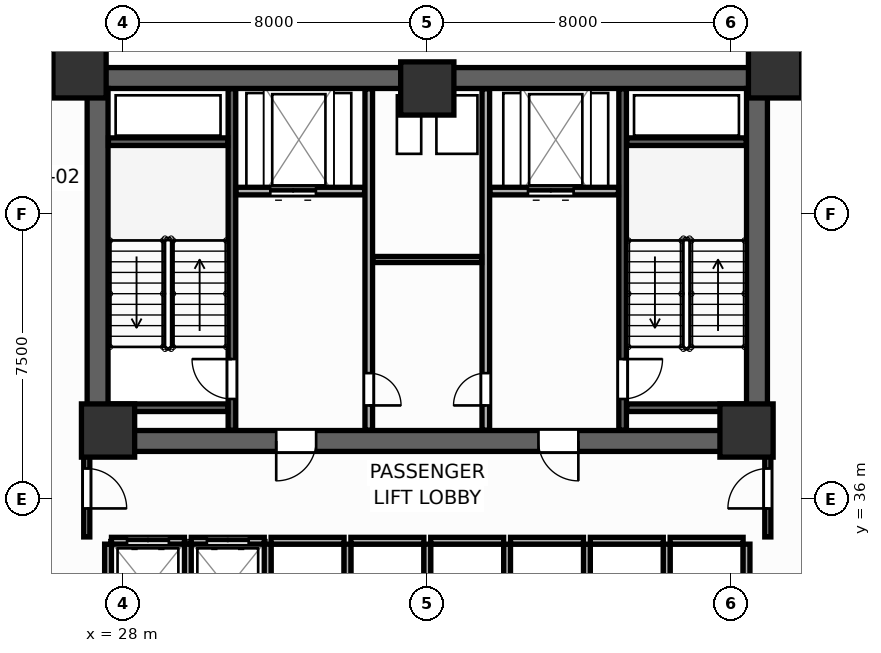
"""IFC4 building model, lengths in metres.
Left out: names, types, materials, properties, quantities, classifications, styles, units other than length and angle.
Written with IfcOpenShell. Run it as: python <this file> out.ifc"""

import sys

from ifc_helpers import new_model, si_unit, direction, frame, frame_2d, origin, origin_2d, place, context, subcontext, project, spatial, rectangle, extrude, source, transform, mapped, element, fill, save


model = new_model("IFC4")
c1 = context("Model", 3, precision=1e-05, world=origin(), true_north=direction((0.0, 1.0)))
c2 = subcontext(c1, "Body", "Model", "MODEL_VIEW")
j1 = project(units=[si_unit("LENGTHUNIT", "METRE"), si_unit("PLANEANGLEUNIT", "RADIAN")], contexts=[c1])
p1 = place(None, origin())
s1 = spatial("IfcSite", under=j1, at=p1, CompositionType="ELEMENT")
p2 = place(p1, origin())
s2 = spatial("IfcBuilding", under=s1, at=p2, CompositionType="ELEMENT")
p3 = place(p2, frame((0.0, 0.0, 35.7)))
s3 = spatial("IfcBuildingStorey", under=s2, at=p3, CompositionType="ELEMENT", Elevation=35.7)
p4 = place(p3, frame((27.05, 47.075, 0.0), z_axis=(0.0, 0.0, 1.0), x_axis=(1.0, 0.0, 0.0)))
e1 = element("IfcWall", 1, at=p4, inside=s3, PredefinedType="SHEAR", context=c2, shape_type="SweptSolid", body=[
    extrude(rectangle(XDim=17.9, YDim=0.55, at=frame_2d((8.95, 0.0))), origin(), (0.0, 0.0, 1.0), 3.9),
])
p5 = place(p3, frame((27.05, 37.525, 0.0), z_axis=(0.0, 0.0, 1.0), x_axis=(1.0, 0.0, 0.0)))
e2 = element("IfcWall", 2, at=p5, inside=s3, PredefinedType="SHEAR", context=c2, shape_type="SweptSolid", body=[
    extrude(rectangle(XDim=17.9, YDim=0.55, at=frame_2d((8.95, 0.0))), origin(), (0.0, 0.0, 1.0), 3.9),
])
p6 = place(p5, frame((4.975, 0.0, 0.0)))
e3 = element("IfcOpeningElement", 3, at=p6, cuts=e2, PredefinedType="OPENING", context=c2, shape_type="SweptSolid", body=[
    extrude(rectangle(XDim=1.05, YDim=2.1, at=frame_2d((0.525, 1.05))), frame((0.0, 0.285, 0.0), z_axis=(0.0, -1.0, 0.0), x_axis=(1.0, 0.0, 0.0)), (0.0, 0.0, 1.0), 0.57),
])
p7 = place(p5, frame((11.875, 0.0, 0.0)))
e4 = element("IfcOpeningElement", 4, at=p7, cuts=e2, PredefinedType="OPENING", context=c2, shape_type="SweptSolid", body=[
    extrude(rectangle(XDim=1.05, YDim=2.1, at=frame_2d((0.525, 1.05))), frame((0.0, 0.285, 0.0), z_axis=(0.0, -1.0, 0.0), x_axis=(1.0, 0.0, 0.0)), (0.0, 0.0, 1.0), 0.57),
])
for number, where, z_axis, x_axis in (
    (5, (27.325, 37.8, 0.0), (0.0, 0.0, 1.0), (0.0, 1.0, 0.0)),
    (6, (44.675, 37.8, 0.0), (0.0, 0.0, 1.0), (0.0, 1.0, 0.0)),
):
    element("IfcWall", number, at=place(p3, frame(where, z_axis=z_axis, x_axis=x_axis)), inside=s3, PredefinedType="SHEAR", context=c2, shape_type="SweptSolid", body=[
        extrude(rectangle(XDim=9.0, YDim=0.55, at=frame_2d((4.5, 0.0))), origin(), (0.0, 0.0, 1.0), 3.9),
    ])
m1 = source(origin(), c2, "Body", "SweptSolid", [
    extrude(rectangle(XDim=1.4, YDim=1.4, at=origin_2d()), origin(), (0.0, 0.0, 1.0), 3.9),
])
for number, where, z_axis, x_axis in (
    (7, (26.85, 47.25, 0.0), (0.0, 0.0, 1.0), (1.0, 0.0, 0.0)),
    (8, (45.15, 47.25, 0.0), (0.0, 0.0, 1.0), (1.0, 0.0, 0.0)),
    (9, (27.6, 37.8, 0.0), (0.0, 0.0, 1.0), (1.0, 0.0, 0.0)),
    (10, (44.4, 37.8, 0.0), (0.0, 0.0, 1.0), (1.0, 0.0, 0.0)),
    (11, (36.0, 46.8, 0.0), (0.0, 0.0, 1.0), (1.0, 0.0, 0.0)),
):
    element("IfcColumn", number, at=place(p3, frame(where, z_axis=z_axis, x_axis=x_axis)), inside=s3, PredefinedType="COLUMN", context=c2, shape_type="MappedRepresentation", body=[
        mapped(m1, transform((0.0, 0.0, 0.0), scale=1.0)),
    ])
p8 = place(p3, frame((30.86, 37.81, 0.0), z_axis=(0.0, 0.0, 1.0), x_axis=(0.0, 1.0, 0.0)))
e12 = element("IfcWall", 12, at=p8, inside=s3, PredefinedType="SHEAR", context=c2, shape_type="SweptSolid", body=[
    extrude(rectangle(XDim=8.98, YDim=0.2, at=frame_2d((4.49, 0.0))), origin(), (0.0, 0.0, 1.0), 3.9),
])
p9 = place(p8, frame((0.82, 0.0, 0.0)))
e13 = element("IfcOpeningElement", 13, at=p9, cuts=e12, PredefinedType="OPENING", context=c2, shape_type="SweptSolid", body=[
    extrude(rectangle(XDim=1.05, YDim=2.1, at=frame_2d((0.525, 1.05))), frame((0.0, 0.11, 0.0), z_axis=(0.0, -1.0, 0.0), x_axis=(1.0, 0.0, 0.0)), (0.0, 0.0, 1.0), 0.22),
])
for number, where, z_axis, x_axis in (
    (14, (27.61, 45.4, 0.0), (0.0, 0.0, 1.0), (1.0, 0.0, 0.0)),
    (15, (27.61, 38.4, 0.0), (0.0, 0.0, 1.0), (1.0, 0.0, 0.0)),
):
    element("IfcWall", number, at=place(p3, frame(where, z_axis=z_axis, x_axis=x_axis)), inside=s3, PredefinedType="SHEAR", context=c2, shape_type="SweptSolid", body=[
        extrude(rectangle(XDim=3.14, YDim=0.2, at=frame_2d((1.57, 0.0))), origin(), (0.0, 0.0, 1.0), 3.9),
    ])
p10 = place(p3, frame((41.14, 37.81, 0.0), z_axis=(0.0, 0.0, 1.0), x_axis=(0.0, 1.0, 0.0)))
e16 = element("IfcWall", 16, at=p10, inside=s3, PredefinedType="SHEAR", context=c2, shape_type="SweptSolid", body=[
    extrude(rectangle(XDim=8.98, YDim=0.2, at=frame_2d((4.49, 0.0))), origin(), (0.0, 0.0, 1.0), 3.9),
])
p11 = place(p10, frame((0.82, 0.0, 0.0)))
e17 = element("IfcOpeningElement", 17, at=p11, cuts=e16, PredefinedType="OPENING", context=c2, shape_type="SweptSolid", body=[
    extrude(rectangle(XDim=1.05, YDim=2.1, at=frame_2d((0.525, 1.05))), frame((0.0, 0.11, 0.0), z_axis=(0.0, -1.0, 0.0), x_axis=(1.0, 0.0, 0.0)), (0.0, 0.0, 1.0), 0.22),
])
for number, where, z_axis, x_axis in (
    (18, (41.25, 45.4, 0.0), (0.0, 0.0, 1.0), (1.0, 0.0, 0.0)),
    (19, (41.25, 38.4, 0.0), (0.0, 0.0, 1.0), (1.0, 0.0, 0.0)),
):
    element("IfcWall", number, at=place(p3, frame(where, z_axis=z_axis, x_axis=x_axis)), inside=s3, PredefinedType="SHEAR", context=c2, shape_type="SweptSolid", body=[
        extrude(rectangle(XDim=3.14, YDim=0.2, at=frame_2d((1.57, 0.0))), origin(), (0.0, 0.0, 1.0), 3.9),
    ])
p12 = place(p3, frame((30.97, 44.1, 0.0), z_axis=(0.0, 0.0, 1.0), x_axis=(1.0, 0.0, 0.0)))
e20 = element("IfcWall", 20, at=p12, inside=s3, PredefinedType="PARTITIONING", context=c2, shape_type="SweptSolid", body=[
    extrude(rectangle(XDim=3.38, YDim=0.2, at=frame_2d((1.69, 0.0))), origin(), (0.0, 0.0, 1.0), 3.68),
])
p13 = place(p12, frame((0.9, 0.0, 0.0)))
e21 = element("IfcOpeningElement", 21, at=p13, cuts=e20, PredefinedType="OPENING", context=c2, shape_type="SweptSolid", body=[
    extrude(rectangle(XDim=1.2, YDim=2.1, at=frame_2d((0.6, 1.05))), frame((0.0, 0.11, 0.0), z_axis=(0.0, -1.0, 0.0), x_axis=(1.0, 0.0, 0.0)), (0.0, 0.0, 1.0), 0.22),
])
p14 = place(p3, frame((37.65, 44.1, 0.0), z_axis=(0.0, 0.0, 1.0), x_axis=(1.0, 0.0, 0.0)))
e22 = element("IfcWall", 22, at=p14, inside=s3, PredefinedType="PARTITIONING", context=c2, shape_type="SweptSolid", body=[
    extrude(rectangle(XDim=3.38, YDim=0.2, at=frame_2d((1.69, 0.0))), origin(), (0.0, 0.0, 1.0), 3.68),
])
p15 = place(p14, frame((1.0, 0.0, 0.0)))
e23 = element("IfcOpeningElement", 23, at=p15, cuts=e22, PredefinedType="OPENING", context=c2, shape_type="SweptSolid", body=[
    extrude(rectangle(XDim=1.2, YDim=2.1, at=frame_2d((0.6, 1.05))), frame((0.0, 0.11, 0.0), z_axis=(0.0, -1.0, 0.0), x_axis=(1.0, 0.0, 0.0)), (0.0, 0.0, 1.0), 0.22),
])
p16 = place(p3, frame((34.46, 37.81, 0.0), z_axis=(0.0, 0.0, 1.0), x_axis=(0.0, 1.0, 0.0)))
e24 = element("IfcWall", 24, at=p16, inside=s3, PredefinedType="PARTITIONING", context=c2, shape_type="SweptSolid", body=[
    extrude(rectangle(XDim=8.98, YDim=0.2, at=frame_2d((4.49, 0.0))), origin(), (0.0, 0.0, 1.0), 3.68),
])
p17 = place(p16, frame((0.65, 0.0, 0.0)))
e25 = element("IfcOpeningElement", 25, at=p17, cuts=e24, PredefinedType="OPENING", context=c2, shape_type="SweptSolid", body=[
    extrude(rectangle(XDim=0.85, YDim=2.05, at=frame_2d((0.425, 1.025))), frame((0.0, 0.11, 0.0), z_axis=(0.0, -1.0, 0.0), x_axis=(1.0, 0.0, 0.0)), (0.0, 0.0, 1.0), 0.22),
])
p18 = place(p3, frame((37.54, 37.81, 0.0), z_axis=(0.0, 0.0, 1.0), x_axis=(0.0, 1.0, 0.0)))
e26 = element("IfcWall", 26, at=p18, inside=s3, PredefinedType="PARTITIONING", context=c2, shape_type="SweptSolid", body=[
    extrude(rectangle(XDim=8.98, YDim=0.2, at=frame_2d((4.49, 0.0))), origin(), (0.0, 0.0, 1.0), 3.68),
])
p19 = place(p18, frame((0.65, 0.0, 0.0)))
e27 = element("IfcOpeningElement", 27, at=p19, cuts=e26, PredefinedType="OPENING", context=c2, shape_type="SweptSolid", body=[
    extrude(rectangle(XDim=0.85, YDim=2.05, at=frame_2d((0.425, 1.025))), frame((0.0, 0.11, 0.0), z_axis=(0.0, -1.0, 0.0), x_axis=(1.0, 0.0, 0.0)), (0.0, 0.0, 1.0), 0.22),
])
p20 = place(p3, frame((34.57, 42.3, 0.0), z_axis=(0.0, 0.0, 1.0), x_axis=(1.0, 0.0, 0.0)))
e28 = element("IfcWall", 28, at=p20, inside=s3, PredefinedType="PARTITIONING", context=c2, shape_type="SweptSolid", body=[
    extrude(rectangle(XDim=2.86, YDim=0.16, at=frame_2d((1.43, 0.0))), origin(), (0.0, 0.0, 1.0), 3.68),
])
p21 = place(p3, frame((27.69, 34.9, 0.0), z_axis=(0.0, 0.0, 1.0), x_axis=(1.0, 0.0, 0.0)))
e29 = element("IfcWall", 29, at=p21, inside=s3, PredefinedType="PARTITIONING", context=c2, shape_type="SweptSolid", body=[
    extrude(rectangle(XDim=1.92, YDim=0.18, at=frame_2d((0.96, 0.0))), origin(), (0.0, 0.0, 1.0), 3.68),
])
p22 = place(p21, frame((0.41, 0.0, 0.0)))
e30 = element("IfcOpeningElement", 30, at=p22, cuts=e29, PredefinedType="OPENING", context=c2, shape_type="SweptSolid", body=[
    extrude(rectangle(XDim=1.1, YDim=2.1, at=frame_2d((0.55, 1.05))), frame((0.0, 0.1, 0.0), z_axis=(0.0, -1.0, 0.0), x_axis=(1.0, 0.0, 0.0)), (0.0, 0.0, 1.0), 0.2),
])
p23 = place(p3, frame((27.6, 32.49, 0.0), z_axis=(0.0, 0.0, 1.0), x_axis=(0.0, 1.0, 0.0)))
e31 = element("IfcWall", 31, at=p23, inside=s3, PredefinedType="PARTITIONING", context=c2, shape_type="SweptSolid", body=[
    extrude(rectangle(XDim=2.32, YDim=0.18, at=frame_2d((1.16, 0.0))), origin(), (0.0, 0.0, 1.0), 3.68),
])
p24 = place(p3, frame((29.79, 34.9, 0.0), z_axis=(0.0, 0.0, 1.0), x_axis=(1.0, 0.0, 0.0)))
e32 = element("IfcWall", 32, at=p24, inside=s3, PredefinedType="PARTITIONING", context=c2, shape_type="SweptSolid", body=[
    extrude(rectangle(XDim=1.92, YDim=0.18, at=frame_2d((0.96, 0.0))), origin(), (0.0, 0.0, 1.0), 3.68),
])
p25 = place(p24, frame((0.41, 0.0, 0.0)))
e33 = element("IfcOpeningElement", 33, at=p25, cuts=e32, PredefinedType="OPENING", context=c2, shape_type="SweptSolid", body=[
    extrude(rectangle(XDim=1.1, YDim=2.1, at=frame_2d((0.55, 1.05))), frame((0.0, 0.1, 0.0), z_axis=(0.0, -1.0, 0.0), x_axis=(1.0, 0.0, 0.0)), (0.0, 0.0, 1.0), 0.2),
])
p26 = place(p3, frame((29.7, 32.49, 0.0), z_axis=(0.0, 0.0, 1.0), x_axis=(0.0, 1.0, 0.0)))
e34 = element("IfcWall", 34, at=p26, inside=s3, PredefinedType="PARTITIONING", context=c2, shape_type="SweptSolid", body=[
    extrude(rectangle(XDim=2.32, YDim=0.18, at=frame_2d((1.16, 0.0))), origin(), (0.0, 0.0, 1.0), 3.68),
])
p27 = place(p3, frame((31.89, 34.9, 0.0), z_axis=(0.0, 0.0, 1.0), x_axis=(1.0, 0.0, 0.0)))
e35 = element("IfcWall", 35, at=p27, inside=s3, PredefinedType="PARTITIONING", context=c2, shape_type="SweptSolid", body=[
    extrude(rectangle(XDim=1.92, YDim=0.18, at=frame_2d((0.96, 0.0))), origin(), (0.0, 0.0, 1.0), 3.68),
])
p28 = place(p3, frame((31.8, 32.49, 0.0), z_axis=(0.0, 0.0, 1.0), x_axis=(0.0, 1.0, 0.0)))
e36 = element("IfcWall", 36, at=p28, inside=s3, PredefinedType="PARTITIONING", context=c2, shape_type="SweptSolid", body=[
    extrude(rectangle(XDim=2.32, YDim=0.18, at=frame_2d((1.16, 0.0))), origin(), (0.0, 0.0, 1.0), 3.68),
])
p29 = place(p3, frame((33.99, 34.9, 0.0), z_axis=(0.0, 0.0, 1.0), x_axis=(1.0, 0.0, 0.0)))
e37 = element("IfcWall", 37, at=p29, inside=s3, PredefinedType="PARTITIONING", context=c2, shape_type="SweptSolid", body=[
    extrude(rectangle(XDim=1.92, YDim=0.18, at=frame_2d((0.96, 0.0))), origin(), (0.0, 0.0, 1.0), 3.68),
])
p30 = place(p3, frame((33.9, 32.49, 0.0), z_axis=(0.0, 0.0, 1.0), x_axis=(0.0, 1.0, 0.0)))
e38 = element("IfcWall", 38, at=p30, inside=s3, PredefinedType="PARTITIONING", context=c2, shape_type="SweptSolid", body=[
    extrude(rectangle(XDim=2.32, YDim=0.18, at=frame_2d((1.16, 0.0))), origin(), (0.0, 0.0, 1.0), 3.68),
])
p31 = place(p3, frame((36.09, 34.9, 0.0), z_axis=(0.0, 0.0, 1.0), x_axis=(1.0, 0.0, 0.0)))
e39 = element("IfcWall", 39, at=p31, inside=s3, PredefinedType="PARTITIONING", context=c2, shape_type="SweptSolid", body=[
    extrude(rectangle(XDim=1.92, YDim=0.18, at=frame_2d((0.96, 0.0))), origin(), (0.0, 0.0, 1.0), 3.68),
])
p32 = place(p3, frame((36.0, 32.49, 0.0), z_axis=(0.0, 0.0, 1.0), x_axis=(0.0, 1.0, 0.0)))
e40 = element("IfcWall", 40, at=p32, inside=s3, PredefinedType="PARTITIONING", context=c2, shape_type="SweptSolid", body=[
    extrude(rectangle(XDim=2.32, YDim=0.18, at=frame_2d((1.16, 0.0))), origin(), (0.0, 0.0, 1.0), 3.68),
])
p33 = place(p3, frame((38.19, 34.9, 0.0), z_axis=(0.0, 0.0, 1.0), x_axis=(1.0, 0.0, 0.0)))
e41 = element("IfcWall", 41, at=p33, inside=s3, PredefinedType="PARTITIONING", context=c2, shape_type="SweptSolid", body=[
    extrude(rectangle(XDim=1.92, YDim=0.18, at=frame_2d((0.96, 0.0))), origin(), (0.0, 0.0, 1.0), 3.68),
])
p34 = place(p3, frame((38.1, 32.49, 0.0), z_axis=(0.0, 0.0, 1.0), x_axis=(0.0, 1.0, 0.0)))
e42 = element("IfcWall", 42, at=p34, inside=s3, PredefinedType="PARTITIONING", context=c2, shape_type="SweptSolid", body=[
    extrude(rectangle(XDim=2.32, YDim=0.18, at=frame_2d((1.16, 0.0))), origin(), (0.0, 0.0, 1.0), 3.68),
])
p35 = place(p3, frame((40.29, 34.9, 0.0), z_axis=(0.0, 0.0, 1.0), x_axis=(1.0, 0.0, 0.0)))
e43 = element("IfcWall", 43, at=p35, inside=s3, PredefinedType="PARTITIONING", context=c2, shape_type="SweptSolid", body=[
    extrude(rectangle(XDim=1.92, YDim=0.18, at=frame_2d((0.96, 0.0))), origin(), (0.0, 0.0, 1.0), 3.68),
])
p36 = place(p3, frame((40.2, 32.49, 0.0), z_axis=(0.0, 0.0, 1.0), x_axis=(0.0, 1.0, 0.0)))
e44 = element("IfcWall", 44, at=p36, inside=s3, PredefinedType="PARTITIONING", context=c2, shape_type="SweptSolid", body=[
    extrude(rectangle(XDim=2.32, YDim=0.18, at=frame_2d((1.16, 0.0))), origin(), (0.0, 0.0, 1.0), 3.68),
])
p37 = place(p3, frame((42.39, 34.9, 0.0), z_axis=(0.0, 0.0, 1.0), x_axis=(1.0, 0.0, 0.0)))
e45 = element("IfcWall", 45, at=p37, inside=s3, PredefinedType="PARTITIONING", context=c2, shape_type="SweptSolid", body=[
    extrude(rectangle(XDim=1.92, YDim=0.18, at=frame_2d((0.96, 0.0))), origin(), (0.0, 0.0, 1.0), 3.68),
])
for number, where, z_axis, x_axis in (
    (46, (42.3, 32.49, 0.0), (0.0, 0.0, 1.0), (0.0, 1.0, 0.0)),
    (47, (44.4, 32.49, 0.0), (0.0, 0.0, 1.0), (0.0, 1.0, 0.0)),
):
    element("IfcWall", number, at=place(p3, frame(where, z_axis=z_axis, x_axis=x_axis)), inside=s3, PredefinedType="PARTITIONING", context=c2, shape_type="SweptSolid", body=[
        extrude(rectangle(XDim=2.32, YDim=0.18, at=frame_2d((1.16, 0.0))), origin(), (0.0, 0.0, 1.0), 3.68),
    ])
p38 = place(p3, frame((27.04, 35.0, 0.0), z_axis=(0.0, 0.0, 1.0), x_axis=(0.0, 1.0, 0.0)))
e48 = element("IfcWall", 48, at=p38, inside=s3, PredefinedType="PARTITIONING", context=c2, shape_type="SweptSolid", body=[
    extrude(rectangle(XDim=2.65, YDim=0.16, at=frame_2d((1.325, 0.0))), origin(), (0.0, 0.0, 1.0), 3.68),
])
p39 = place(p38, frame((0.75, 0.0, 0.0)))
e49 = element("IfcOpeningElement", 49, at=p39, cuts=e48, PredefinedType="OPENING", context=c2, shape_type="SweptSolid", body=[
    extrude(rectangle(XDim=1.05, YDim=2.1, at=frame_2d((0.525, 1.05))), frame((0.0, 0.09, 0.0), z_axis=(0.0, -1.0, 0.0), x_axis=(1.0, 0.0, 0.0)), (0.0, 0.0, 1.0), 0.18),
])
p40 = place(p3, frame((44.96, 35.0, 0.0), z_axis=(0.0, 0.0, 1.0), x_axis=(0.0, 1.0, 0.0)))
e50 = element("IfcWall", 50, at=p40, inside=s3, PredefinedType="PARTITIONING", context=c2, shape_type="SweptSolid", body=[
    extrude(rectangle(XDim=2.65, YDim=0.16, at=frame_2d((1.325, 0.0))), origin(), (0.0, 0.0, 1.0), 3.68),
])
p41 = place(p40, frame((0.75, 0.0, 0.0)))
e51 = element("IfcOpeningElement", 51, at=p41, cuts=e50, PredefinedType="OPENING", context=c2, shape_type="SweptSolid", body=[
    extrude(rectangle(XDim=1.05, YDim=2.1, at=frame_2d((0.525, 1.05))), frame((0.0, 0.09, 0.0), z_axis=(0.0, -1.0, 0.0), x_axis=(1.0, 0.0, 0.0)), (0.0, 0.0, 1.0), 0.18),
])
p42 = place(p3, frame((27.035, 47.34, 0.0), z_axis=(0.0, 0.0, 1.0), x_axis=(0.0, 1.0, 0.0)))
e52 = element("IfcWall", 52, at=p42, inside=s3, PredefinedType="PARTITIONING", context=c2, shape_type="SweptSolid", body=[
    extrude(rectangle(XDim=9.869, YDim=0.16, at=frame_2d((4.935, 0.0))), origin(), (0.0, 0.0, 1.0), 2.24),
])
p43 = place(p42, frame((4.354, 0.0, 0.0)))
e53 = element("IfcOpeningElement", 53, at=p43, cuts=e52, PredefinedType="OPENING", context=c2, shape_type="SweptSolid", body=[
    extrude(rectangle(XDim=0.95, YDim=2.05, at=frame_2d((0.475, 1.025))), frame((0.0, 0.09, 0.0), z_axis=(0.0, -1.0, 0.0), x_axis=(1.0, 0.0, 0.0)), (0.0, 0.0, 1.0), 0.18),
])
p44 = place(p3, frame((44.965, 47.34, 0.0), z_axis=(0.0, 0.0, 1.0), x_axis=(0.0, 1.0, 0.0)))
e54 = element("IfcWall", 54, at=p44, inside=s3, PredefinedType="PARTITIONING", context=c2, shape_type="SweptSolid", body=[
    extrude(rectangle(XDim=9.869, YDim=0.16, at=frame_2d((4.935, 0.0))), origin(), (0.0, 0.0, 1.0), 2.24),
])
p45 = place(p9, origin())
e55 = element("IfcDoor", 55, at=p45, inside=s3, OperationType="SINGLE_SWING_RIGHT", PredefinedType="DOOR", context=c2, shape_type="SweptSolid", body=[
    extrude(rectangle(XDim=1.05, YDim=2.1, at=frame_2d((0.525, 1.05))), frame((0.0, 0.025, 0.0), z_axis=(0.0, -1.0, 0.0), x_axis=(1.0, 0.0, 0.0)), (0.0, 0.0, 1.0), 0.05),
])
fill(e13, e55)
p46 = place(p11, frame((1.05, 0.0, 0.0), z_axis=(0.0, 0.0, 1.0), x_axis=(-1.0, 0.0, 0.0)))
e56 = element("IfcDoor", 56, at=p46, inside=s3, OperationType="SINGLE_SWING_LEFT", PredefinedType="DOOR", context=c2, shape_type="SweptSolid", body=[
    extrude(rectangle(XDim=1.05, YDim=2.1, at=frame_2d((0.525, 1.05))), frame((0.0, 0.025, 0.0), z_axis=(0.0, -1.0, 0.0), x_axis=(1.0, 0.0, 0.0)), (0.0, 0.0, 1.0), 0.05),
])
fill(e17, e56)
p47 = place(p13, origin())
e57 = element("IfcDoor", 57, at=p47, inside=s3, OperationType="DOUBLE_DOOR_SLIDING", PredefinedType="DOOR", context=c2, shape_type="SweptSolid", body=[
    extrude(rectangle(XDim=1.2, YDim=2.1, at=frame_2d((0.6, 1.05))), frame((0.0, 0.025, 0.0), z_axis=(0.0, -1.0, 0.0), x_axis=(1.0, 0.0, 0.0)), (0.0, 0.0, 1.0), 0.05),
])
fill(e21, e57)
p48 = place(p15, origin())
e58 = element("IfcDoor", 58, at=p48, inside=s3, OperationType="DOUBLE_DOOR_SLIDING", PredefinedType="DOOR", context=c2, shape_type="SweptSolid", body=[
    extrude(rectangle(XDim=1.2, YDim=2.1, at=frame_2d((0.6, 1.05))), frame((0.0, 0.025, 0.0), z_axis=(0.0, -1.0, 0.0), x_axis=(1.0, 0.0, 0.0)), (0.0, 0.0, 1.0), 0.05),
])
fill(e23, e58)
p49 = place(p17, frame((0.85, 0.0, 0.0), z_axis=(0.0, 0.0, 1.0), x_axis=(-1.0, 0.0, 0.0)))
e59 = element("IfcDoor", 59, at=p49, inside=s3, OperationType="SINGLE_SWING_RIGHT", PredefinedType="DOOR", context=c2, shape_type="SweptSolid", body=[
    extrude(rectangle(XDim=0.85, YDim=2.05, at=frame_2d((0.425, 1.025))), frame((0.0, 0.025, 0.0), z_axis=(0.0, -1.0, 0.0), x_axis=(1.0, 0.0, 0.0)), (0.0, 0.0, 1.0), 0.05),
])
fill(e25, e59)
p50 = place(p19, origin())
e60 = element("IfcDoor", 60, at=p50, inside=s3, OperationType="SINGLE_SWING_LEFT", PredefinedType="DOOR", context=c2, shape_type="SweptSolid", body=[
    extrude(rectangle(XDim=0.85, YDim=2.05, at=frame_2d((0.425, 1.025))), frame((0.0, 0.025, 0.0), z_axis=(0.0, -1.0, 0.0), x_axis=(1.0, 0.0, 0.0)), (0.0, 0.0, 1.0), 0.05),
])
fill(e27, e60)
p51 = place(p22, origin())
e61 = element("IfcDoor", 61, at=p51, inside=s3, OperationType="DOUBLE_DOOR_SLIDING", PredefinedType="DOOR", context=c2, shape_type="SweptSolid", body=[
    extrude(rectangle(XDim=1.1, YDim=2.1, at=frame_2d((0.55, 1.05))), frame((0.0, 0.025, 0.0), z_axis=(0.0, -1.0, 0.0), x_axis=(1.0, 0.0, 0.0)), (0.0, 0.0, 1.0), 0.05),
])
fill(e30, e61)
p52 = place(p25, origin())
e62 = element("IfcDoor", 62, at=p52, inside=s3, OperationType="DOUBLE_DOOR_SLIDING", PredefinedType="DOOR", context=c2, shape_type="SweptSolid", body=[
    extrude(rectangle(XDim=1.1, YDim=2.1, at=frame_2d((0.55, 1.05))), frame((0.0, 0.025, 0.0), z_axis=(0.0, -1.0, 0.0), x_axis=(1.0, 0.0, 0.0)), (0.0, 0.0, 1.0), 0.05),
])
fill(e33, e62)
p53 = place(p39, frame((1.05, 0.0, 0.0), z_axis=(0.0, 0.0, 1.0), x_axis=(-1.0, 0.0, 0.0)))
e63 = element("IfcDoor", 63, at=p53, inside=s3, OperationType="SINGLE_SWING_RIGHT", PredefinedType="DOOR", context=c2, shape_type="SweptSolid", body=[
    extrude(rectangle(XDim=1.05, YDim=2.1, at=frame_2d((0.525, 1.05))), frame((0.0, 0.025, 0.0), z_axis=(0.0, -1.0, 0.0), x_axis=(1.0, 0.0, 0.0)), (0.0, 0.0, 1.0), 0.05),
])
fill(e49, e63)
p54 = place(p41, origin())
e64 = element("IfcDoor", 64, at=p54, inside=s3, OperationType="SINGLE_SWING_LEFT", PredefinedType="DOOR", context=c2, shape_type="SweptSolid", body=[
    extrude(rectangle(XDim=1.05, YDim=2.1, at=frame_2d((0.525, 1.05))), frame((0.0, 0.025, 0.0), z_axis=(0.0, -1.0, 0.0), x_axis=(1.0, 0.0, 0.0)), (0.0, 0.0, 1.0), 0.05),
])
fill(e51, e64)
p55 = place(p6, frame((1.05, 0.0, 0.0), z_axis=(0.0, 0.0, 1.0), x_axis=(-1.0, 0.0, 0.0)))
e65 = element("IfcDoor", 65, at=p55, inside=s3, OperationType="SINGLE_SWING_RIGHT", PredefinedType="DOOR", context=c2, shape_type="SweptSolid", body=[
    extrude(rectangle(XDim=1.05, YDim=2.1, at=frame_2d((0.525, 1.05))), frame((0.0, 0.025, 0.0), z_axis=(0.0, -1.0, 0.0), x_axis=(1.0, 0.0, 0.0)), (0.0, 0.0, 1.0), 0.05),
])
fill(e3, e65)
p56 = place(p7, frame((1.05, 0.0, 0.0), z_axis=(0.0, 0.0, 1.0), x_axis=(-1.0, 0.0, 0.0)))
e66 = element("IfcDoor", 66, at=p56, inside=s3, OperationType="SINGLE_SWING_LEFT", PredefinedType="DOOR", context=c2, shape_type="SweptSolid", body=[
    extrude(rectangle(XDim=1.05, YDim=2.1, at=frame_2d((0.525, 1.05))), frame((0.0, 0.025, 0.0), z_axis=(0.0, -1.0, 0.0), x_axis=(1.0, 0.0, 0.0)), (0.0, 0.0, 1.0), 0.05),
])
fill(e4, e66)
save(model, sys.argv[1])
